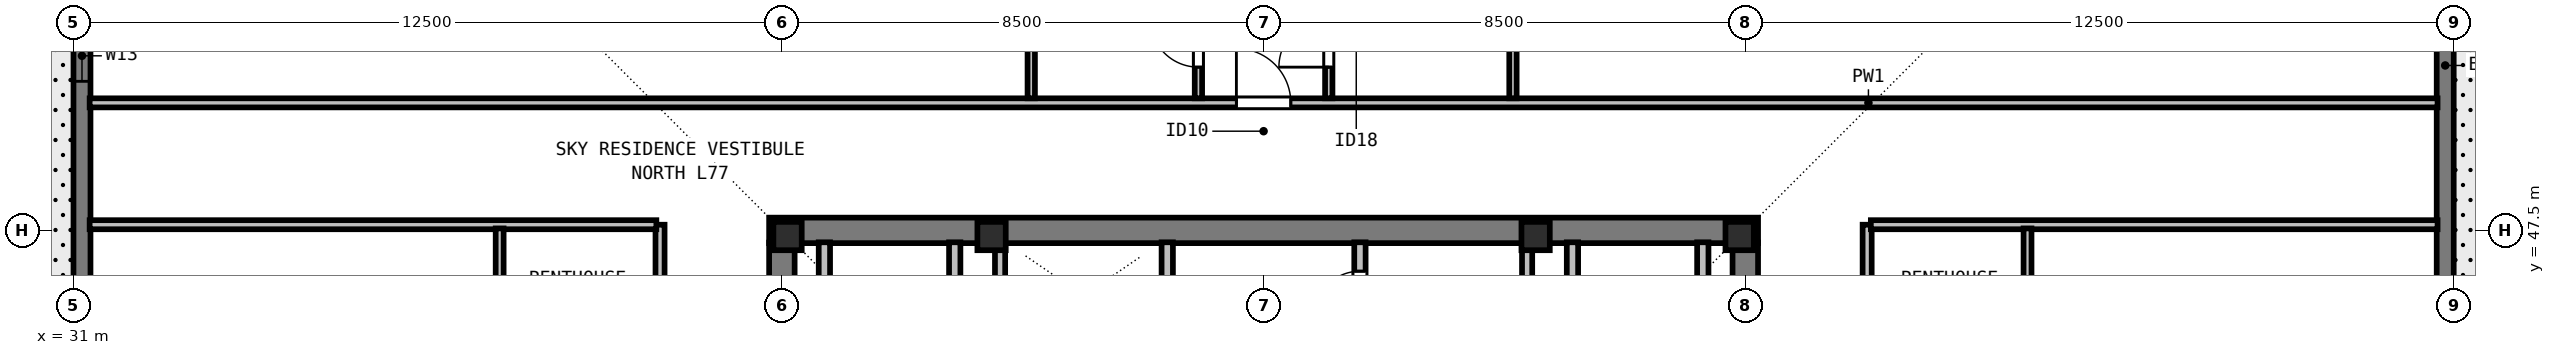
"""IFC4 building model, lengths in metres.
Left out: names, types, materials, properties, quantities, classifications, styles, units other than length and angle.
Written with IfcOpenShell. Run it as: python <this file> out.ifc"""

import sys

from ifc_helpers import new_model, si_unit, direction, frame, frame_2d, origin, origin_2d, place, context, subcontext, project, spatial, rectangle, i_section, extrude, element, fill, save


model = new_model("IFC4")
c1 = context("Model", 3, precision=1e-05, world=origin(), true_north=direction((0.0, 1.0)))
c2 = subcontext(c1, "Body", "Model", "MODEL_VIEW")
j1 = project(units=[si_unit("LENGTHUNIT", "METRE"), si_unit("PLANEANGLEUNIT", "RADIAN")], contexts=[c1])
p1 = place(None, origin())
s1 = spatial("IfcSite", under=j1, at=p1, CompositionType="ELEMENT")
p2 = place(p1, origin())
s2 = spatial("IfcBuilding", under=s1, at=p2, CompositionType="ELEMENT")
p3 = place(p2, frame((0.0, 0.0, 280.5)))
s3 = spatial("IfcBuildingStorey", under=s2, at=p3, CompositionType="ELEMENT", Elevation=280.5)
for number, where, z_axis, x_axis in (
    (1, (43.6, 47.4, 0.0), (0.0, 0.0, 1.0), (1.0, 0.0, 0.0)),
    (2, (47.2, 47.4, 0.0), (0.0, 0.0, 1.0), (1.0, 0.0, 0.0)),
    (3, (56.8, 47.4, 0.0), (0.0, 0.0, 1.0), (1.0, 0.0, 0.0)),
    (4, (60.4, 47.4, 0.0), (0.0, 0.0, 1.0), (1.0, 0.0, 0.0)),
):
    element("IfcColumn", number, at=place(p3, frame(where, z_axis=z_axis, x_axis=x_axis)), inside=s3, PredefinedType="COLUMN", context=c2, shape_type="SweptSolid", body=[
        extrude(i_section(OverallWidth=0.5, OverallDepth=0.5, WebThickness=0.028, FlangeThickness=0.045, at=origin_2d()), origin(), (0.0, 0.0, 1.0), 3.5),
    ])
p4 = place(p3, frame((31.15, 23.5, 0.0), z_axis=(0.0, 0.0, 1.0), x_axis=(0.0, 1.0, 0.0)))
e5 = element("IfcWall", 5, at=p4, inside=s3, PredefinedType="SOLIDWALL", context=c2, shape_type="SweptSolid", body=[
    extrude(rectangle(XDim=30.722, YDim=0.3, at=frame_2d((15.361, 0.0))), origin(), (0.0, 0.0, 1.0), 3.29),
])
p5 = place(p4, frame((8.331, 0.0, 0.8)))
e6 = element("IfcOpeningElement", 6, at=p5, cuts=e5, PredefinedType="OPENING", context=c2, shape_type="SweptSolid", body=[
    extrude(rectangle(XDim=1.65, YDim=1.758, at=frame_2d((0.825, 0.879))), frame((0.0, 0.16, 0.0), z_axis=(0.0, -1.0, 0.0), x_axis=(1.0, 0.0, 0.0)), (0.0, 0.0, 1.0), 0.32),
])
p6 = place(p4, frame((12.442, 0.0, 0.8)))
e7 = element("IfcOpeningElement", 7, at=p6, cuts=e5, PredefinedType="OPENING", context=c2, shape_type="SweptSolid", body=[
    extrude(rectangle(XDim=2.0, YDim=1.758, at=frame_2d((1.0, 0.879))), frame((0.0, 0.16, 0.0), z_axis=(0.0, -1.0, 0.0), x_axis=(1.0, 0.0, 0.0)), (0.0, 0.0, 1.0), 0.32),
])
p7 = place(p4, frame((17.304, 0.0, 0.8)))
e8 = element("IfcOpeningElement", 8, at=p7, cuts=e5, PredefinedType="OPENING", context=c2, shape_type="SweptSolid", body=[
    extrude(rectangle(XDim=1.65, YDim=1.758, at=frame_2d((0.825, 0.879))), frame((0.0, 0.16, 0.0), z_axis=(0.0, -1.0, 0.0), x_axis=(1.0, 0.0, 0.0)), (0.0, 0.0, 1.0), 0.32),
])
p8 = place(p4, frame((20.967, 0.0, 0.8)))
e9 = element("IfcOpeningElement", 9, at=p8, cuts=e5, PredefinedType="OPENING", context=c2, shape_type="SweptSolid", body=[
    extrude(rectangle(XDim=2.0, YDim=1.758, at=frame_2d((1.0, 0.879))), frame((0.0, 0.16, 0.0), z_axis=(0.0, -1.0, 0.0), x_axis=(1.0, 0.0, 0.0)), (0.0, 0.0, 1.0), 0.32),
])
p9 = place(p4, frame((26.63, 0.0, 0.8)))
e10 = element("IfcOpeningElement", 10, at=p9, cuts=e5, PredefinedType="OPENING", context=c2, shape_type="SweptSolid", body=[
    extrude(rectangle(XDim=0.9, YDim=1.75, at=frame_2d((0.45, 0.875))), frame((0.0, 0.16, 0.0), z_axis=(0.0, -1.0, 0.0), x_axis=(1.0, 0.0, 0.0)), (0.0, 0.0, 1.0), 0.32),
])
p10 = place(p3, frame((72.85, 54.5, 0.0), z_axis=(0.0, 0.0, 1.0), x_axis=(0.0, -1.0, 0.0)))
e11 = element("IfcWall", 11, at=p10, inside=s3, PredefinedType="SOLIDWALL", context=c2, shape_type="SweptSolid", body=[
    extrude(rectangle(XDim=30.722, YDim=0.3, at=frame_2d((15.361, 0.0))), origin(), (0.0, 0.0, 1.0), 3.29),
])
p11 = place(p10, frame((8.331, 0.0, 0.8)))
e12 = element("IfcOpeningElement", 12, at=p11, cuts=e11, PredefinedType="OPENING", context=c2, shape_type="SweptSolid", body=[
    extrude(rectangle(XDim=1.65, YDim=1.758, at=frame_2d((0.825, 0.879))), frame((0.0, 0.16, 0.0), z_axis=(0.0, -1.0, 0.0), x_axis=(1.0, 0.0, 0.0)), (0.0, 0.0, 1.0), 0.32),
])
p12 = place(p10, frame((11.593, 0.0, 0.8)))
e13 = element("IfcOpeningElement", 13, at=p12, cuts=e11, PredefinedType="OPENING", context=c2, shape_type="SweptSolid", body=[
    extrude(rectangle(XDim=2.0, YDim=1.758, at=frame_2d((1.0, 0.879))), frame((0.0, 0.16, 0.0), z_axis=(0.0, -1.0, 0.0), x_axis=(1.0, 0.0, 0.0)), (0.0, 0.0, 1.0), 0.32),
])
p13 = place(p10, frame((16.455, 0.0, 0.8)))
e14 = element("IfcOpeningElement", 14, at=p13, cuts=e11, PredefinedType="OPENING", context=c2, shape_type="SweptSolid", body=[
    extrude(rectangle(XDim=1.65, YDim=1.758, at=frame_2d((0.825, 0.879))), frame((0.0, 0.16, 0.0), z_axis=(0.0, -1.0, 0.0), x_axis=(1.0, 0.0, 0.0)), (0.0, 0.0, 1.0), 0.32),
])
p14 = place(p10, frame((20.967, 0.0, 0.8)))
e15 = element("IfcOpeningElement", 15, at=p14, cuts=e11, PredefinedType="OPENING", context=c2, shape_type="SweptSolid", body=[
    extrude(rectangle(XDim=2.0, YDim=1.758, at=frame_2d((1.0, 0.879))), frame((0.0, 0.16, 0.0), z_axis=(0.0, -1.0, 0.0), x_axis=(1.0, 0.0, 0.0)), (0.0, 0.0, 1.0), 0.32),
])
p15 = place(p3, frame((43.275, 47.5, 0.0), z_axis=(0.0, 0.0, 1.0), x_axis=(1.0, 0.0, 0.0)))
e16 = element("IfcWall", 16, at=p15, inside=s3, PredefinedType="SHEAR", context=c2, shape_type="SweptSolid", body=[
    extrude(rectangle(XDim=17.45, YDim=0.45, at=frame_2d((8.725, 0.0))), origin(), (0.0, 0.0, 1.0), 3.29),
])
for number, where, z_axis, x_axis in (
    (17, (43.5, 40.8, 0.0), (0.0, 0.0, 1.0), (0.0, 1.0, 0.0)),
    (18, (60.5, 40.8, 0.0), (0.0, 0.0, 1.0), (0.0, 1.0, 0.0)),
):
    element("IfcWall", number, at=place(p3, frame(where, z_axis=z_axis, x_axis=x_axis)), inside=s3, PredefinedType="SHEAR", context=c2, shape_type="SweptSolid", body=[
        extrude(rectangle(XDim=6.485, YDim=0.45, at=frame_2d((3.242, 0.0))), origin(), (0.0, 0.0, 1.0), 3.29),
    ])
p16 = place(p3, frame((50.3, 40.585, 0.0), z_axis=(0.0, 0.0, 1.0), x_axis=(0.0, 1.0, 0.0)))
e19 = element("IfcWall", 19, at=p16, inside=s3, PredefinedType="SOLIDWALL", context=c2, shape_type="SweptSolid", body=[
    extrude(rectangle(XDim=6.705, YDim=0.2, at=frame_2d((3.353, 0.0))), origin(), (0.0, 0.0, 1.0), 3.29),
])
p17 = place(p16, frame((0.515, 0.0, 0.0)))
e20 = element("IfcOpeningElement", 20, at=p17, cuts=e19, PredefinedType="OPENING", context=c2, shape_type="SweptSolid", body=[
    extrude(rectangle(XDim=1.1, YDim=2.2, at=frame_2d((0.55, 1.1))), frame((0.0, 0.11, 0.0), z_axis=(0.0, -1.0, 0.0), x_axis=(1.0, 0.0, 0.0)), (0.0, 0.0, 1.0), 0.22),
])
p18 = place(p16, frame((3.015, 0.0, 0.0)))
e21 = element("IfcOpeningElement", 21, at=p18, cuts=e19, PredefinedType="OPENING", context=c2, shape_type="SweptSolid", body=[
    extrude(rectangle(XDim=1.1, YDim=2.2, at=frame_2d((0.55, 1.1))), frame((0.0, 0.11, 0.0), z_axis=(0.0, -1.0, 0.0), x_axis=(1.0, 0.0, 0.0)), (0.0, 0.0, 1.0), 0.22),
])
p19 = place(p16, frame((5.065, 0.0, 0.0)))
e22 = element("IfcOpeningElement", 22, at=p19, cuts=e19, PredefinedType="OPENING", context=c2, shape_type="SweptSolid", body=[
    extrude(rectangle(XDim=0.8, YDim=2.08, at=frame_2d((0.4, 1.04))), frame((0.0, 0.11, 0.0), z_axis=(0.0, -1.0, 0.0), x_axis=(1.0, 0.0, 0.0)), (0.0, 0.0, 1.0), 0.22),
])
p20 = place(p3, frame((53.7, 40.585, 0.0), z_axis=(0.0, 0.0, 1.0), x_axis=(0.0, 1.0, 0.0)))
e23 = element("IfcWall", 23, at=p20, inside=s3, PredefinedType="SOLIDWALL", context=c2, shape_type="SweptSolid", body=[
    extrude(rectangle(XDim=6.705, YDim=0.2, at=frame_2d((3.353, 0.0))), origin(), (0.0, 0.0, 1.0), 3.29),
])
p21 = place(p20, frame((0.195, 0.0, 0.0)))
e24 = element("IfcOpeningElement", 24, at=p21, cuts=e23, PredefinedType="OPENING", context=c2, shape_type="SweptSolid", body=[
    extrude(rectangle(XDim=0.8, YDim=2.08, at=frame_2d((0.4, 1.04))), frame((0.0, 0.11, 0.0), z_axis=(0.0, -1.0, 0.0), x_axis=(1.0, 0.0, 0.0)), (0.0, 0.0, 1.0), 0.22),
])
p22 = place(p20, frame((1.865, 0.0, 0.0)))
e25 = element("IfcOpeningElement", 25, at=p22, cuts=e23, PredefinedType="OPENING", context=c2, shape_type="SweptSolid", body=[
    extrude(rectangle(XDim=1.1, YDim=2.2, at=frame_2d((0.55, 1.1))), frame((0.0, 0.11, 0.0), z_axis=(0.0, -1.0, 0.0), x_axis=(1.0, 0.0, 0.0)), (0.0, 0.0, 1.0), 0.22),
])
p23 = place(p20, frame((3.735, 0.0, 0.0)))
e26 = element("IfcOpeningElement", 26, at=p23, cuts=e23, PredefinedType="OPENING", context=c2, shape_type="SweptSolid", body=[
    extrude(rectangle(XDim=0.9, YDim=2.12, at=frame_2d((0.45, 1.06))), frame((0.0, 0.11, 0.0), z_axis=(0.0, -1.0, 0.0), x_axis=(1.0, 0.0, 0.0)), (0.0, 0.0, 1.0), 0.22),
])
p24 = place(p20, frame((5.395, 0.0, 0.0)))
e27 = element("IfcOpeningElement", 27, at=p24, cuts=e23, PredefinedType="OPENING", context=c2, shape_type="SweptSolid", body=[
    extrude(rectangle(XDim=0.8, YDim=2.1, at=frame_2d((0.4, 1.05))), frame((0.0, 0.11, 0.0), z_axis=(0.0, -1.0, 0.0), x_axis=(1.0, 0.0, 0.0)), (0.0, 0.0, 1.0), 0.22),
])
for number, where, z_axis, x_axis in (
    (28, (46.55, 43.735, 0.0), (0.0, 0.0, 1.0), (0.0, 1.0, 0.0)),
    (29, (44.25, 43.735, 0.0), (0.0, 0.0, 1.0), (0.0, 1.0, 0.0)),
    (30, (57.45, 43.735, 0.0), (0.0, 0.0, 1.0), (0.0, 1.0, 0.0)),
    (31, (59.75, 43.735, 0.0), (0.0, 0.0, 1.0), (0.0, 1.0, 0.0)),
):
    element("IfcWall", number, at=place(p3, frame(where, z_axis=z_axis, x_axis=x_axis)), inside=s3, PredefinedType="SOLIDWALL", context=c2, shape_type="SweptSolid", body=[
        extrude(rectangle(XDim=3.555, YDim=0.2, at=frame_2d((1.777, 0.0))), origin(), (0.0, 0.0, 1.0), 3.29),
    ])
for number, where, z_axis, x_axis in (
    (32, (47.35, 43.735, 0.0), (0.0, 0.0, 1.0), (0.0, 1.0, 0.0)),
    (33, (56.65, 43.735, 0.0), (0.0, 0.0, 1.0), (0.0, 1.0, 0.0)),
):
    element("IfcWall", number, at=place(p3, frame(where, z_axis=z_axis, x_axis=x_axis)), inside=s3, PredefinedType="SOLIDWALL", context=c2, shape_type="SweptSolid", body=[
        extrude(rectangle(XDim=3.555, YDim=0.18, at=frame_2d((1.777, 0.0))), origin(), (0.0, 0.0, 1.0), 3.29),
    ])
p25 = place(p3, frame((31.285, 49.75, 0.0), z_axis=(0.0, 0.0, 1.0), x_axis=(1.0, 0.0, 0.0)))
e34 = element("IfcWall", 34, at=p25, inside=s3, PredefinedType="PARTITIONING", context=c2, shape_type="SweptSolid", body=[
    extrude(rectangle(XDim=41.43, YDim=0.16, at=frame_2d((20.715, 0.0))), origin(), (0.0, 0.0, 1.0), 3.009),
])
p26 = place(p25, frame((20.235, 0.0, 0.0)))
e35 = element("IfcOpeningElement", 35, at=p26, cuts=e34, PredefinedType="OPENING", context=c2, shape_type="SweptSolid", body=[
    extrude(rectangle(XDim=0.96, YDim=2.18, at=frame_2d((0.48, 1.09))), frame((0.0, 0.09, 0.0), z_axis=(0.0, -1.0, 0.0), x_axis=(1.0, 0.0, 0.0)), (0.0, 0.0, 1.0), 0.18),
])
p27 = place(p3, frame((41.35, 30.4, 0.0), z_axis=(0.0, 0.0, 1.0), x_axis=(0.0, 1.0, 0.0)))
e36 = element("IfcWall", 36, at=p27, inside=s3, PredefinedType="PARTITIONING", context=c2, shape_type="SweptSolid", body=[
    extrude(rectangle(XDim=17.2, YDim=0.16, at=frame_2d((8.6, 0.0))), origin(), (0.0, 0.0, 1.0), 3.009),
])
p28 = place(p27, frame((8.12, 0.0, 0.0)))
e37 = element("IfcOpeningElement", 37, at=p28, cuts=e36, PredefinedType="OPENING", context=c2, shape_type="SweptSolid", body=[
    extrude(rectangle(XDim=0.96, YDim=2.18, at=frame_2d((0.48, 1.09))), frame((0.0, 0.09, 0.0), z_axis=(0.0, -1.0, 0.0), x_axis=(1.0, 0.0, 0.0)), (0.0, 0.0, 1.0), 0.18),
])
p29 = place(p3, frame((62.65, 30.4, 0.0), z_axis=(0.0, 0.0, 1.0), x_axis=(0.0, 1.0, 0.0)))
e38 = element("IfcWall", 38, at=p29, inside=s3, PredefinedType="PARTITIONING", context=c2, shape_type="SweptSolid", body=[
    extrude(rectangle(XDim=17.2, YDim=0.16, at=frame_2d((8.6, 0.0))), origin(), (0.0, 0.0, 1.0), 3.29),
])
p30 = place(p29, frame((8.12, 0.0, 0.0)))
e39 = element("IfcOpeningElement", 39, at=p30, cuts=e38, PredefinedType="OPENING", context=c2, shape_type="SweptSolid", body=[
    extrude(rectangle(XDim=0.96, YDim=2.18, at=frame_2d((0.48, 1.09))), frame((0.0, 0.09, 0.0), z_axis=(0.0, -1.0, 0.0), x_axis=(1.0, 0.0, 0.0)), (0.0, 0.0, 1.0), 0.18),
])
for number, where, z_axis, x_axis in (
    (40, (31.285, 47.6, 0.0), (0.0, 0.0, 1.0), (1.0, 0.0, 0.0)),
    (41, (62.715, 47.6, 0.0), (0.0, 0.0, 1.0), (1.0, 0.0, 0.0)),
):
    element("IfcWall", number, at=place(p3, frame(where, z_axis=z_axis, x_axis=x_axis)), inside=s3, PredefinedType="PARTITIONING", context=c2, shape_type="SweptSolid", body=[
        extrude(rectangle(XDim=10.0, YDim=0.16, at=frame_2d((5.0, 0.0))), origin(), (0.0, 0.0, 1.0), 3.29),
    ])
p31 = place(p3, frame((47.9, 49.83, 0.0), z_axis=(0.0, 0.0, 1.0), x_axis=(0.0, 1.0, 0.0)))
e42 = element("IfcWall", 42, at=p31, inside=s3, PredefinedType="PLUMBINGWALL", context=c2, shape_type="SweptSolid", body=[
    extrude(rectangle(XDim=2.75, YDim=0.13, at=frame_2d((1.375, 0.0))), origin(), (0.0, 0.0, 1.0), 3.29),
])
p32 = place(p3, frame((50.85, 49.83, 0.0), z_axis=(0.0, 0.0, 1.0), x_axis=(0.0, 1.0, 0.0)))
e43 = element("IfcWall", 43, at=p32, inside=s3, PredefinedType="PLUMBINGWALL", context=c2, shape_type="SweptSolid", body=[
    extrude(rectangle(XDim=2.75, YDim=0.13, at=frame_2d((1.375, 0.0))), origin(), (0.0, 0.0, 1.0), 3.009),
])
p33 = place(p32, frame((0.55, 0.0, 0.0)))
e44 = element("IfcOpeningElement", 44, at=p33, cuts=e43, PredefinedType="OPENING", context=c2, shape_type="SweptSolid", body=[
    extrude(rectangle(XDim=0.85, YDim=2.08, at=frame_2d((0.425, 1.04))), frame((0.0, 0.075, 0.0), z_axis=(0.0, -1.0, 0.0), x_axis=(1.0, 0.0, 0.0)), (0.0, 0.0, 1.0), 0.15),
])
p34 = place(p3, frame((56.4, 49.83, 0.0), z_axis=(0.0, 0.0, 1.0), x_axis=(0.0, 1.0, 0.0)))
e45 = element("IfcWall", 45, at=p34, inside=s3, PredefinedType="PLUMBINGWALL", context=c2, shape_type="SweptSolid", body=[
    extrude(rectangle(XDim=2.75, YDim=0.13, at=frame_2d((1.375, 0.0))), origin(), (0.0, 0.0, 1.0), 3.29),
])
p35 = place(p3, frame((53.15, 49.83, 0.0), z_axis=(0.0, 0.0, 1.0), x_axis=(0.0, 1.0, 0.0)))
e46 = element("IfcWall", 46, at=p35, inside=s3, PredefinedType="PLUMBINGWALL", context=c2, shape_type="SweptSolid", body=[
    extrude(rectangle(XDim=2.75, YDim=0.13, at=frame_2d((1.375, 0.0))), origin(), (0.0, 0.0, 1.0), 3.29),
])
p36 = place(p35, frame((0.55, 0.0, 0.0)))
e47 = element("IfcOpeningElement", 47, at=p36, cuts=e46, PredefinedType="OPENING", context=c2, shape_type="SweptSolid", body=[
    extrude(rectangle(XDim=0.88, YDim=2.1, at=frame_2d((0.44, 1.05))), frame((0.0, 0.075, 0.0), z_axis=(0.0, -1.0, 0.0), x_axis=(1.0, 0.0, 0.0)), (0.0, 0.0, 1.0), 0.15),
])
p37 = place(p3, frame((38.52, 43.475, 0.0), z_axis=(0.0, 0.0, 1.0), x_axis=(0.0, 1.0, 0.0)))
e48 = element("IfcWall", 48, at=p37, inside=s3, PredefinedType="PARTITIONING", context=c2, shape_type="SweptSolid", body=[
    extrude(rectangle(XDim=4.06, YDim=0.14, at=frame_2d((2.03, 0.0))), origin(), (0.0, 0.0, 1.0), 3.29),
])
p38 = place(p37, frame((0.375, 0.0, 0.0)))
e49 = element("IfcOpeningElement", 49, at=p38, cuts=e48, PredefinedType="OPENING", context=c2, shape_type="SweptSolid", body=[
    extrude(rectangle(XDim=0.82, YDim=2.1, at=frame_2d((0.41, 1.05))), frame((0.0, 0.08, 0.0), z_axis=(0.0, -1.0, 0.0), x_axis=(1.0, 0.0, 0.0)), (0.0, 0.0, 1.0), 0.16),
])
p39 = place(p3, frame((65.48, 43.475, 0.0), z_axis=(0.0, 0.0, 1.0), x_axis=(0.0, 1.0, 0.0)))
e50 = element("IfcWall", 50, at=p39, inside=s3, PredefinedType="PARTITIONING", context=c2, shape_type="SweptSolid", body=[
    extrude(rectangle(XDim=4.06, YDim=0.14, at=frame_2d((2.03, 0.0))), origin(), (0.0, 0.0, 1.0), 3.29),
])
p40 = place(p39, frame((0.375, 0.0, 0.0)))
e51 = element("IfcOpeningElement", 51, at=p40, cuts=e50, PredefinedType="OPENING", context=c2, shape_type="SweptSolid", body=[
    extrude(rectangle(XDim=0.82, YDim=2.1, at=frame_2d((0.41, 1.05))), frame((0.0, 0.08, 0.0), z_axis=(0.0, -1.0, 0.0), x_axis=(1.0, 0.0, 0.0)), (0.0, 0.0, 1.0), 0.16),
])
p41 = place(p9, origin())
e52 = element("IfcWindow", 52, at=p41, inside=s3, PartitioningType="SINGLE_PANEL", PredefinedType="WINDOW", context=c2, shape_type="SweptSolid", body=[
    extrude(rectangle(XDim=0.9, YDim=1.75, at=frame_2d((0.45, 0.875))), frame((0.0, -0.04, 0.0), z_axis=(0.0, -1.0, 0.0), x_axis=(1.0, 0.0, 0.0)), (0.0, 0.0, 1.0), 0.06),
])
fill(e10, e52)
p42 = place(p24, origin())
e53 = element("IfcDoor", 53, at=p42, inside=s3, OperationType="SINGLE_SWING_LEFT", PredefinedType="DOOR", context=c2, shape_type="SweptSolid", body=[
    extrude(rectangle(XDim=0.8, YDim=2.1, at=frame_2d((0.4, 1.05))), frame((0.0, 0.025, 0.0), z_axis=(0.0, -1.0, 0.0), x_axis=(1.0, 0.0, 0.0)), (0.0, 0.0, 1.0), 0.05),
])
fill(e27, e53)
p43 = place(p33, origin())
e54 = element("IfcDoor", 54, at=p43, inside=s3, OperationType="SINGLE_SWING_RIGHT", PredefinedType="DOOR", context=c2, shape_type="SweptSolid", body=[
    extrude(rectangle(XDim=0.85, YDim=2.08, at=frame_2d((0.425, 1.04))), frame((0.0, 0.025, 0.0), z_axis=(0.0, -1.0, 0.0), x_axis=(1.0, 0.0, 0.0)), (0.0, 0.0, 1.0), 0.05),
])
fill(e44, e54)
p44 = place(p36, origin())
e55 = element("IfcDoor", 55, at=p44, inside=s3, OperationType="SINGLE_SWING_LEFT", PredefinedType="DOOR", context=c2, shape_type="SweptSolid", body=[
    extrude(rectangle(XDim=0.88, YDim=2.1, at=frame_2d((0.44, 1.05))), frame((0.0, 0.025, 0.0), z_axis=(0.0, -1.0, 0.0), x_axis=(1.0, 0.0, 0.0)), (0.0, 0.0, 1.0), 0.05),
])
fill(e47, e55)
p45 = place(p26, origin())
e56 = element("IfcDoor", 56, at=p45, inside=s3, OperationType="SINGLE_SWING_LEFT", PredefinedType="DOOR", context=c2, shape_type="SweptSolid", body=[
    extrude(rectangle(XDim=0.96, YDim=2.18, at=frame_2d((0.48, 1.09))), frame((0.0, 0.025, 0.0), z_axis=(0.0, -1.0, 0.0), x_axis=(1.0, 0.0, 0.0)), (0.0, 0.0, 1.0), 0.05),
])
fill(e35, e56)
save(model, sys.argv[1])
